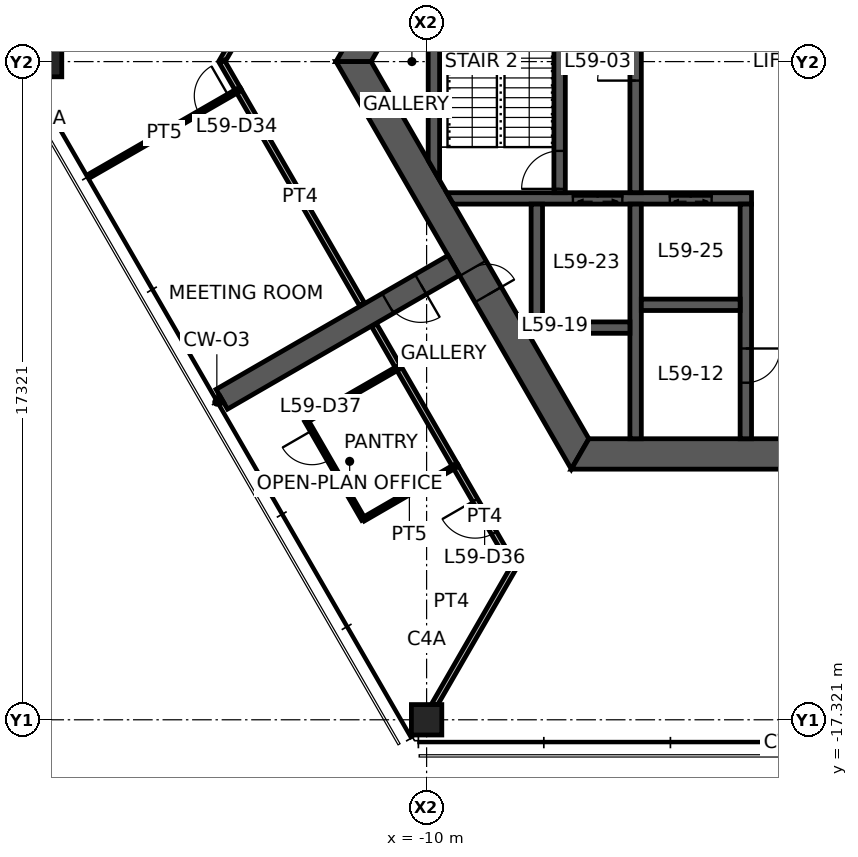
"""IFC4 building model, lengths in metres.
Left out: names, types, materials, properties, quantities, classifications, styles, units other than length and angle.
Written with IfcOpenShell. Run it as: python <this file> out.ifc"""

import sys

from ifc_helpers import new_model, si_unit, direction, frame, frame_2d, origin, origin_2d, place, context, subcontext, project, spatial, polyline, rectangle, hollow_rectangle, outline, extrude, element, fill, save


model = new_model("IFC4")
c1 = context("Model", 3, precision=1e-05, world=origin(), true_north=direction((0.0, 1.0)))
c2 = subcontext(c1, "Body", "Model", "MODEL_VIEW")
j1 = project(units=[si_unit("LENGTHUNIT", "METRE"), si_unit("PLANEANGLEUNIT", "RADIAN")], contexts=[c1])
p1 = place(None, origin())
s1 = spatial("IfcSite", under=j1, at=p1, CompositionType="ELEMENT")
p2 = place(p1, origin())
s2 = spatial("IfcBuilding", under=s1, at=p2, CompositionType="ELEMENT")
p3 = place(p2, frame((0.0, 0.0, 236.2)))
s3 = spatial("IfcBuildingStorey", under=s2, at=p3, CompositionType="ELEMENT", Elevation=236.2)
for number, where, z_axis, x_axis in (
    (1, (-20.0, 0.0, 0.0), (0.0, 0.0, 1.0), (1.0, 0.0, 0.0)),
    (2, (-10.0, -17.321, 0.0), (0.0, 0.0, 1.0), (1.0, 0.0, 0.0)),
):
    element("IfcColumn", number, at=place(p3, frame(where, z_axis=z_axis, x_axis=x_axis)), inside=s3, PredefinedType="COLUMN", context=c2, shape_type="SweptSolid", body=[
        extrude(hollow_rectangle(XDim=0.8, YDim=0.8, WallThickness=0.04, at=origin_2d()), origin(), (0.0, 0.0, 1.0), 3.9),
    ])
p4 = place(p3, frame((-5.961, 10.325, 0.0), z_axis=(0.0, 0.0, 1.0), x_axis=(-0.500004296715, -0.866022923061, 0.0)))
e3 = element("IfcWall", 3, at=p4, inside=s3, PredefinedType="SHEAR", context=c2, shape_type="SweptSolid", body=[
    extrude(outline(polyline([(-0.231, -0.4), (4.494, -0.4), (5.494, -0.4), (12.153, -0.4), (11.691, 0.4), (5.494, 0.4), (4.494, 0.4), (0.231, 0.4), (-0.231, -0.4)])), origin(), (0.0, 0.0, 1.0), 3.9),
])
p5 = place(p4, frame((4.494, 0.0, 0.0)))
e4 = element("IfcOpeningElement", 4, at=p5, cuts=e3, PredefinedType="OPENING", context=c2, shape_type="SweptSolid", body=[
    extrude(rectangle(XDim=1.0, YDim=2.1, at=frame_2d((0.5, 1.05))), frame((0.0, 0.41, 0.0), z_axis=(0.0, -1.0, 0.0), x_axis=(1.0, 0.0, 0.0)), (0.0, 0.0, 1.0), 0.82),
])
p6 = place(p3, frame((-11.922, 0.0, 0.0), z_axis=(0.0, 0.0, 1.0), x_axis=(0.500004296715, -0.866022923061, 0.0)))
e5 = element("IfcWall", 5, at=p6, inside=s3, PredefinedType="SHEAR", context=c2, shape_type="SweptSolid", body=[
    extrude(outline(polyline([(-0.231, -0.4), (6.281, -0.4), (7.081, -0.4), (12.153, -0.4), (11.691, 0.4), (7.081, 0.4), (6.281, 0.4), (0.231, 0.4), (-0.231, -0.4)])), origin(), (0.0, 0.0, 1.0), 3.9),
])
p7 = place(p6, frame((6.281, 0.0, 0.0)))
e6 = element("IfcOpeningElement", 6, at=p7, cuts=e5, PredefinedType="OPENING", context=c2, shape_type="SweptSolid", body=[
    extrude(rectangle(XDim=0.8, YDim=2.1, at=frame_2d((0.4, 1.05))), frame((0.0, 0.41, 0.0), z_axis=(0.0, -1.0, 0.0), x_axis=(1.0, 0.0, 0.0)), (0.0, 0.0, 1.0), 0.82),
])
p8 = place(p3, frame((-5.961, -10.325, 0.0), z_axis=(0.0, 0.0, 1.0), x_axis=(1.0, 0.0, 0.0)))
e7 = element("IfcWall", 7, at=p8, inside=s3, PredefinedType="SHEAR", context=c2, shape_type="SweptSolid", body=[
    extrude(outline(polyline([(-0.231, -0.4), (5.461, -0.4), (6.461, -0.4), (12.153, -0.4), (11.691, 0.4), (6.461, 0.4), (5.461, 0.4), (0.231, 0.4), (-0.231, -0.4)])), origin(), (0.0, 0.0, 1.0), 3.9),
])
p9 = place(p8, frame((5.461, 0.0, 0.0)))
e8 = element("IfcOpeningElement", 8, at=p9, cuts=e7, PredefinedType="OPENING", context=c2, shape_type="SweptSolid", body=[
    extrude(rectangle(XDim=1.0, YDim=2.1, at=frame_2d((0.5, 1.05))), frame((0.0, 0.41, 0.0), z_axis=(0.0, -1.0, 0.0), x_axis=(1.0, 0.0, 0.0)), (0.0, 0.0, 1.0), 0.82),
])
p10 = place(p3, frame((-9.288, -5.363, 0.0), z_axis=(0.0, 0.0, 1.0), x_axis=(-0.866027473358, -0.499996415376, 0.0)))
e9 = element("IfcWall", 9, at=p10, inside=s3, PredefinedType="SHEAR", context=c2, shape_type="SweptSolid", body=[
    extrude(rectangle(XDim=7.045, YDim=0.6, at=frame_2d((3.523, 0.0))), origin(), (0.0, 0.0, 1.0), 3.9),
])
p11 = place(p10, frame((1.0, 0.0, 0.0)))
e10 = element("IfcOpeningElement", 10, at=p11, cuts=e9, PredefinedType="OPENING", context=c2, shape_type="SweptSolid", body=[
    extrude(rectangle(XDim=1.0, YDim=2.1, at=frame_2d((0.5, 1.05))), frame((0.0, 0.31, 0.0), z_axis=(0.0, -1.0, 0.0), x_axis=(1.0, 0.0, 0.0)), (0.0, 0.0, 1.0), 0.62),
])
p12 = place(p3, frame((-9.382, -3.6, 0.0), z_axis=(0.0, 0.0, 1.0), x_axis=(1.0, 0.0, 0.0)))
e11 = element("IfcWall", 11, at=p12, inside=s3, PredefinedType="SHEAR", context=c2, shape_type="SweptSolid", body=[
    extrude(outline(polyline([(0.087, -0.15), (3.232, -0.15), (4.532, -0.15), (5.782, -0.15), (6.882, -0.15), (7.932, -0.15), (7.932, 0.15), (6.882, 0.15), (5.782, 0.15), (4.532, 0.15), (3.232, 0.15), (-0.087, 0.15), (0.087, -0.15)])), origin(), (0.0, 0.0, 1.0), 3.9),
])
p13 = place(p12, frame((5.782, 0.0, 0.0)))
e12 = element("IfcOpeningElement", 12, at=p13, cuts=e11, PredefinedType="OPENING", context=c2, shape_type="SweptSolid", body=[
    extrude(rectangle(XDim=1.1, YDim=2.1, at=frame_2d((0.55, 1.05))), frame((0.0, 0.16, 0.0), z_axis=(0.0, -1.0, 0.0), x_axis=(1.0, 0.0, 0.0)), (0.0, 0.0, 1.0), 0.32),
])
p14 = place(p12, frame((3.232, 0.0, 0.0)))
e13 = element("IfcOpeningElement", 13, at=p14, cuts=e11, PredefinedType="OPENING", context=c2, shape_type="SweptSolid", body=[
    extrude(rectangle(XDim=1.3, YDim=2.1, at=frame_2d((0.65, 1.05))), frame((0.0, 0.16, 0.0), z_axis=(0.0, -1.0, 0.0), x_axis=(1.0, 0.0, 0.0)), (0.0, 0.0, 1.0), 0.32),
])
p15 = place(p3, frame((-1.6, -3.75, 0.0), z_axis=(0.0, 0.0, 1.0), x_axis=(0.0, -1.0, 0.0)))
e14 = element("IfcWall", 14, at=p15, inside=s3, PredefinedType="SHEAR", context=c2, shape_type="SweptSolid", body=[
    extrude(rectangle(XDim=6.175, YDim=0.3, at=frame_2d((3.087, 0.0))), origin(), (0.0, 0.0, 1.0), 3.9),
])
p16 = place(p15, frame((3.8, 0.0, 0.0)))
e15 = element("IfcOpeningElement", 15, at=p16, cuts=e14, PredefinedType="OPENING", context=c2, shape_type="SweptSolid", body=[
    extrude(rectangle(XDim=0.9, YDim=2.1, at=frame_2d((0.45, 1.05))), frame((0.0, 0.16, 0.0), z_axis=(0.0, -1.0, 0.0), x_axis=(1.0, 0.0, 0.0)), (0.0, 0.0, 1.0), 0.32),
])
p17 = place(p3, frame((-4.5, -3.45, 0.0), z_axis=(0.0, 0.0, 1.0), x_axis=(0.0, 1.0, 0.0)))
e16 = element("IfcWall", 16, at=p17, inside=s3, PredefinedType="SHEAR", context=c2, shape_type="SweptSolid", body=[
    extrude(rectangle(XDim=6.9, YDim=0.3, at=frame_2d((3.45, 0.0))), origin(), (0.0, 0.0, 1.0), 3.9),
])
p18 = place(p17, frame((2.95, 0.0, 0.0)))
e17 = element("IfcOpeningElement", 17, at=p18, cuts=e16, PredefinedType="OPENING", context=c2, shape_type="SweptSolid", body=[
    extrude(rectangle(XDim=1.0, YDim=2.1, at=frame_2d((0.5, 1.05))), frame((0.0, 0.16, 0.0), z_axis=(0.0, -1.0, 0.0), x_axis=(1.0, 0.0, 0.0)), (0.0, 0.0, 1.0), 0.32),
])
p19 = place(p3, frame((-6.5, -3.45, 0.0), z_axis=(0.0, 0.0, 1.0), x_axis=(0.0, 1.0, 0.0)))
e18 = element("IfcWall", 18, at=p19, inside=s3, PredefinedType="SHEAR", context=c2, shape_type="SweptSolid", body=[
    extrude(rectangle(XDim=6.9, YDim=0.3, at=frame_2d((3.45, 0.0))), origin(), (0.0, 0.0, 1.0), 3.9),
])
p20 = place(p19, frame((0.1, 0.0, 0.0)))
e19 = element("IfcOpeningElement", 19, at=p20, cuts=e18, PredefinedType="OPENING", context=c2, shape_type="SweptSolid", body=[
    extrude(rectangle(XDim=1.0, YDim=2.1, at=frame_2d((0.5, 1.05))), frame((0.0, 0.16, 0.0), z_axis=(0.0, -1.0, 0.0), x_axis=(1.0, 0.0, 0.0)), (0.0, 0.0, 1.0), 0.32),
])
p21 = place(p3, frame((-4.5, -3.75, 0.0), z_axis=(0.0, 0.0, 1.0), x_axis=(0.0, -1.0, 0.0)))
e20 = element("IfcWall", 20, at=p21, inside=s3, PredefinedType="SHEAR", context=c2, shape_type="SweptSolid", body=[
    extrude(rectangle(XDim=6.175, YDim=0.3, at=frame_2d((3.087, 0.0))), origin(), (0.0, 0.0, 1.0), 3.9),
])
for number, where, z_axis, x_axis in (
    (21, (-4.35, -6.4, 0.0), (0.0, 0.0, 1.0), (1.0, 0.0, 0.0)),
    (22, (-7.25, -7.0, 0.0), (0.0, 0.0, 1.0), (1.0, 0.0, 0.0)),
):
    element("IfcWall", number, at=place(p3, frame(where, z_axis=z_axis, x_axis=x_axis)), inside=s3, PredefinedType="SHEAR", context=c2, shape_type="SweptSolid", body=[
        extrude(rectangle(XDim=2.6, YDim=0.3, at=frame_2d((1.3, 0.0))), origin(), (0.0, 0.0, 1.0), 3.9),
    ])
p22 = place(p3, frame((-7.1, -3.75, 0.0), z_axis=(0.0, 0.0, 1.0), x_axis=(0.0, -1.0, 0.0)))
e23 = element("IfcWall", 23, at=p22, inside=s3, PredefinedType="SHEAR", context=c2, shape_type="SweptSolid", body=[
    extrude(rectangle(XDim=3.1, YDim=0.3, at=frame_2d((1.55, 0.0))), origin(), (0.0, 0.0, 1.0), 3.9),
])
p23 = place(p3, frame((-9.808, -2.862, 0.0), z_axis=(0.0, 0.0, 1.0), x_axis=(0.0, 1.0, 0.0)))
e24 = element("IfcWall", 24, at=p23, inside=s3, PredefinedType="SHEAR", context=c2, shape_type="SweptSolid", body=[
    extrude(outline(polyline([(-0.26, -0.15), (5.984, -0.15), (5.465, 0.15), (0.26, 0.15), (-0.26, -0.15)])), origin(), (0.0, 0.0, 1.0), 3.9),
])
p24 = place(p3, frame((-11.7, -6.385, 0.0), z_axis=(0.0, 0.0, 1.0), x_axis=(-0.500003537243, 0.866023361547, 0.0)))
e25 = element("IfcWall", 25, at=p24, inside=s3, PredefinedType="PARTITIONING", context=c2, shape_type="SweptSolid", body=[
    extrude(rectangle(XDim=6.516, YDim=0.15, at=frame_2d((3.258, 0.0))), origin(), (0.0, 0.0, 1.0), 2.95),
])
p25 = place(p3, frame((-15.386, 0.0, 0.0), z_axis=(0.0, 0.0, 1.0), x_axis=(0.50000453164, 0.866022787425, 0.0)))
e26 = element("IfcWall", 26, at=p25, inside=s3, PredefinedType="PARTITIONING", context=c2, shape_type="SweptSolid", body=[
    extrude(rectangle(XDim=11.113, YDim=0.15, at=frame_2d((5.557, 0.0))), origin(), (0.0, 0.0, 1.0), 2.95),
])
p26 = place(p25, frame((5.057, 0.0, 0.0)))
e27 = element("IfcOpeningElement", 27, at=p26, cuts=e26, PredefinedType="OPENING", context=c2, shape_type="SweptSolid", body=[
    extrude(rectangle(XDim=1.0, YDim=2.1, at=frame_2d((0.5, 1.05))), frame((0.0, 0.085, 0.0), z_axis=(0.0, -1.0, 0.0), x_axis=(1.0, 0.0, 0.0)), (0.0, 0.0, 1.0), 0.17),
])
p27 = place(p3, frame((-14.953, -0.75, 0.0), z_axis=(0.0, 0.0, 1.0), x_axis=(-0.500258826225, 0.865875918815, 0.0)))
e28 = element("IfcWall", 28, at=p27, inside=s3, PredefinedType="PARTITIONING", context=c2, shape_type="SweptSolid", body=[
    extrude(rectangle(XDim=0.867, YDim=0.15, at=frame_2d((0.433, 0.0))), origin(), (0.0, 0.0, 1.0), 2.95),
])
p28 = place(p3, frame((-18.857, -3.0, 0.0), z_axis=(0.0, 0.0, 1.0), x_axis=(0.866517357236, 0.4991469419, 0.0)))
e29 = element("IfcWall", 29, at=p28, inside=s3, PredefinedType="PARTITIONING", context=c2, shape_type="SweptSolid", body=[
    extrude(rectangle(XDim=4.506, YDim=0.1, at=frame_2d((2.253, 0.0))), origin(), (0.0, 0.0, 1.0), 2.95),
])
p29 = place(p28, frame((3.306, 0.0, 0.0)))
e30 = element("IfcOpeningElement", 30, at=p29, cuts=e29, PredefinedType="OPENING", context=c2, shape_type="SweptSolid", body=[
    extrude(rectangle(XDim=0.9, YDim=2.1, at=frame_2d((0.45, 1.05))), frame((0.0, 0.06, 0.0), z_axis=(0.0, -1.0, 0.0), x_axis=(1.0, 0.0, 0.0)), (0.0, 0.0, 1.0), 0.12),
])
p30 = place(p3, frame((-9.237, -10.65, 0.0), z_axis=(0.0, 0.0, 1.0), x_axis=(-0.499977562641, 0.866038357612, 0.0)))
e31 = element("IfcWall", 31, at=p30, inside=s3, PredefinedType="PARTITIONING", context=c2, shape_type="SweptSolid", body=[
    extrude(rectangle(XDim=3.01, YDim=0.15, at=frame_2d((1.505, 0.0))), origin(), (0.0, 0.0, 1.0), 2.95),
])
p31 = place(p3, frame((-10.738, -8.052, 0.0), z_axis=(0.0, 0.0, 1.0), x_axis=(-0.500084415177, 0.865976661173, 0.0)))
e32 = element("IfcWall", 32, at=p31, inside=s3, PredefinedType="PARTITIONING", context=c2, shape_type="SweptSolid", body=[
    extrude(rectangle(XDim=1.284, YDim=0.15, at=frame_2d((0.642, 0.0))), origin(), (0.0, 0.0, 1.0), 2.95),
])
p32 = place(p3, frame((-7.705, -13.305, 0.0), z_axis=(0.0, 0.0, 1.0), x_axis=(-0.500024891708, 0.866011032073, 0.0)))
e33 = element("IfcWall", 33, at=p32, inside=s3, PredefinedType="PARTITIONING", context=c2, shape_type="SweptSolid", body=[
    extrude(rectangle(XDim=3.074, YDim=0.15, at=frame_2d((1.537, 0.0))), origin(), (0.0, 0.0, 1.0), 2.95),
])
p33 = place(p32, frame((1.037, 0.0, 0.0)))
e34 = element("IfcOpeningElement", 34, at=p33, cuts=e33, PredefinedType="OPENING", context=c2, shape_type="SweptSolid", body=[
    extrude(rectangle(XDim=1.0, YDim=2.1, at=frame_2d((0.5, 1.05))), frame((0.0, 0.085, 0.0), z_axis=(0.0, -1.0, 0.0), x_axis=(1.0, 0.0, 0.0)), (0.0, 0.0, 1.0), 0.17),
])
p34 = place(p3, frame((-13.165, -9.448, 0.0), z_axis=(0.0, 0.0, 1.0), x_axis=(0.866855433567, 0.498559582492, 0.0)))
e35 = element("IfcWall", 35, at=p34, inside=s3, PredefinedType="PARTITIONING", context=c2, shape_type="SweptSolid", body=[
    extrude(rectangle(XDim=2.8, YDim=0.1, at=frame_2d((1.4, 0.0))), origin(), (0.0, 0.0, 1.0), 2.95),
])
p35 = place(p3, frame((-11.665, -12.046, 0.0), z_axis=(0.0, 0.0, 1.0), x_axis=(-0.499990139034, 0.866031096941, 0.0)))
e36 = element("IfcWall", 36, at=p35, inside=s3, PredefinedType="PARTITIONING", context=c2, shape_type="SweptSolid", body=[
    extrude(rectangle(XDim=3.0, YDim=0.1, at=frame_2d((1.5, 0.0))), origin(), (0.0, 0.0, 1.0), 2.95),
])
p36 = place(p35, frame((1.8, 0.0, 0.0)))
e37 = element("IfcOpeningElement", 37, at=p36, cuts=e36, PredefinedType="OPENING", context=c2, shape_type="SweptSolid", body=[
    extrude(rectangle(XDim=0.9, YDim=2.1, at=frame_2d((0.45, 1.05))), frame((0.0, 0.06, 0.0), z_axis=(0.0, -1.0, 0.0), x_axis=(1.0, 0.0, 0.0)), (0.0, 0.0, 1.0), 0.12),
])
p37 = place(p3, frame((-9.242, -10.642, 0.0), z_axis=(0.0, 0.0, 1.0), x_axis=(-0.865255114713, -0.501331812737, 0.0)))
e38 = element("IfcWall", 38, at=p37, inside=s3, PredefinedType="PARTITIONING", context=c2, shape_type="SweptSolid", body=[
    extrude(rectangle(XDim=2.8, YDim=0.1, at=frame_2d((1.4, 0.0))), origin(), (0.0, 0.0, 1.0), 2.95),
])
p38 = place(p3, frame((-7.705, -13.305, 0.0), z_axis=(0.0, 0.0, 1.0), x_axis=(-0.500036655653, -0.866004239599, 0.0)))
e39 = element("IfcWall", 39, at=p38, inside=s3, PredefinedType="PARTITIONING", context=c2, shape_type="SweptSolid", body=[
    extrude(rectangle(XDim=4.17, YDim=0.15, at=frame_2d((2.085, 0.0))), origin(), (0.0, 0.0, 1.0), 2.95),
])
p39 = place(p3, frame((-15.39, -8.885, 0.0), z_axis=(0.0, 0.0, 1.0), x_axis=(-0.866472036435, -0.499225610396, 0.0)))
e40 = element("IfcWall", 40, at=p39, inside=s3, PredefinedType="PARTITIONING", context=c2, shape_type="SweptSolid", body=[
    extrude(rectangle(XDim=0.085, YDim=0.175, at=frame_2d((0.042, 0.0))), origin(), (0.0, 0.0, 1.0), 3.9),
])
p40 = place(p7, origin())
e41 = element("IfcDoor", 41, at=p40, inside=s3, OperationType="SINGLE_SWING_RIGHT", PredefinedType="DOOR", context=c2, shape_type="SweptSolid", body=[
    extrude(rectangle(XDim=0.8, YDim=2.1, at=frame_2d((0.4, 1.05))), frame((0.0, 0.025, 0.0), z_axis=(0.0, -1.0, 0.0), x_axis=(1.0, 0.0, 0.0)), (0.0, 0.0, 1.0), 0.05),
])
fill(e6, e41)
p41 = place(p18, origin())
e42 = element("IfcDoor", 42, at=p41, inside=s3, OperationType="SINGLE_SWING_LEFT", PredefinedType="DOOR", context=c2, shape_type="SweptSolid", body=[
    extrude(rectangle(XDim=1.0, YDim=2.1, at=frame_2d((0.5, 1.05))), frame((0.0, 0.025, 0.0), z_axis=(0.0, -1.0, 0.0), x_axis=(1.0, 0.0, 0.0)), (0.0, 0.0, 1.0), 0.05),
])
fill(e17, e42)
p42 = place(p20, origin())
e43 = element("IfcDoor", 43, at=p42, inside=s3, OperationType="SINGLE_SWING_LEFT", PredefinedType="DOOR", context=c2, shape_type="SweptSolid", body=[
    extrude(rectangle(XDim=1.0, YDim=2.1, at=frame_2d((0.5, 1.05))), frame((0.0, 0.025, 0.0), z_axis=(0.0, -1.0, 0.0), x_axis=(1.0, 0.0, 0.0)), (0.0, 0.0, 1.0), 0.05),
])
fill(e19, e43)
p43 = place(p16, origin())
e44 = element("IfcDoor", 44, at=p43, inside=s3, OperationType="SINGLE_SWING_LEFT", PredefinedType="DOOR", context=c2, shape_type="SweptSolid", body=[
    extrude(rectangle(XDim=0.9, YDim=2.1, at=frame_2d((0.45, 1.05))), frame((0.0, 0.025, 0.0), z_axis=(0.0, -1.0, 0.0), x_axis=(1.0, 0.0, 0.0)), (0.0, 0.0, 1.0), 0.05),
])
fill(e15, e44)
p44 = place(p11, origin())
e45 = element("IfcDoor", 45, at=p44, inside=s3, OperationType="SINGLE_SWING_LEFT", PredefinedType="DOOR", context=c2, shape_type="SweptSolid", body=[
    extrude(rectangle(XDim=1.0, YDim=2.1, at=frame_2d((0.5, 1.05))), frame((0.0, 0.025, 0.0), z_axis=(0.0, -1.0, 0.0), x_axis=(1.0, 0.0, 0.0)), (0.0, 0.0, 1.0), 0.05),
])
fill(e10, e45)
p45 = place(p29, origin())
e46 = element("IfcDoor", 46, at=p45, inside=s3, OperationType="SINGLE_SWING_RIGHT", PredefinedType="DOOR", context=c2, shape_type="SweptSolid", body=[
    extrude(rectangle(XDim=0.9, YDim=2.1, at=frame_2d((0.45, 1.05))), frame((0.0, 0.025, 0.0), z_axis=(0.0, -1.0, 0.0), x_axis=(1.0, 0.0, 0.0)), (0.0, 0.0, 1.0), 0.05),
])
fill(e30, e46)
p46 = place(p33, origin())
e47 = element("IfcDoor", 47, at=p46, inside=s3, OperationType="SINGLE_SWING_RIGHT", PredefinedType="DOOR", context=c2, shape_type="SweptSolid", body=[
    extrude(rectangle(XDim=1.0, YDim=2.1, at=frame_2d((0.5, 1.05))), frame((0.0, 0.025, 0.0), z_axis=(0.0, -1.0, 0.0), x_axis=(1.0, 0.0, 0.0)), (0.0, 0.0, 1.0), 0.05),
])
fill(e34, e47)
p47 = place(p36, origin())
e48 = element("IfcDoor", 48, at=p47, inside=s3, OperationType="SINGLE_SWING_RIGHT", PredefinedType="DOOR", context=c2, shape_type="SweptSolid", body=[
    extrude(rectangle(XDim=0.9, YDim=2.1, at=frame_2d((0.45, 1.05))), frame((0.0, 0.025, 0.0), z_axis=(0.0, -1.0, 0.0), x_axis=(1.0, 0.0, 0.0)), (0.0, 0.0, 1.0), 0.05),
])
fill(e37, e48)
p48 = place(p13, origin())
e49 = element("IfcDoor", 49, at=p48, inside=s3, OperationType="DOUBLE_DOOR_SLIDING", PredefinedType="DOOR", context=c2, shape_type="SweptSolid", body=[
    extrude(rectangle(XDim=1.1, YDim=2.1, at=frame_2d((0.55, 1.05))), frame((0.0, 0.025, 0.0), z_axis=(0.0, -1.0, 0.0), x_axis=(1.0, 0.0, 0.0)), (0.0, 0.0, 1.0), 0.05),
])
fill(e12, e49)
p49 = place(p14, origin())
e50 = element("IfcDoor", 50, at=p49, inside=s3, OperationType="DOUBLE_DOOR_SLIDING", PredefinedType="DOOR", context=c2, shape_type="SweptSolid", body=[
    extrude(rectangle(XDim=1.3, YDim=2.1, at=frame_2d((0.65, 1.05))), frame((0.0, 0.025, 0.0), z_axis=(0.0, -1.0, 0.0), x_axis=(1.0, 0.0, 0.0)), (0.0, 0.0, 1.0), 0.05),
])
fill(e13, e50)
save(model, sys.argv[1])
